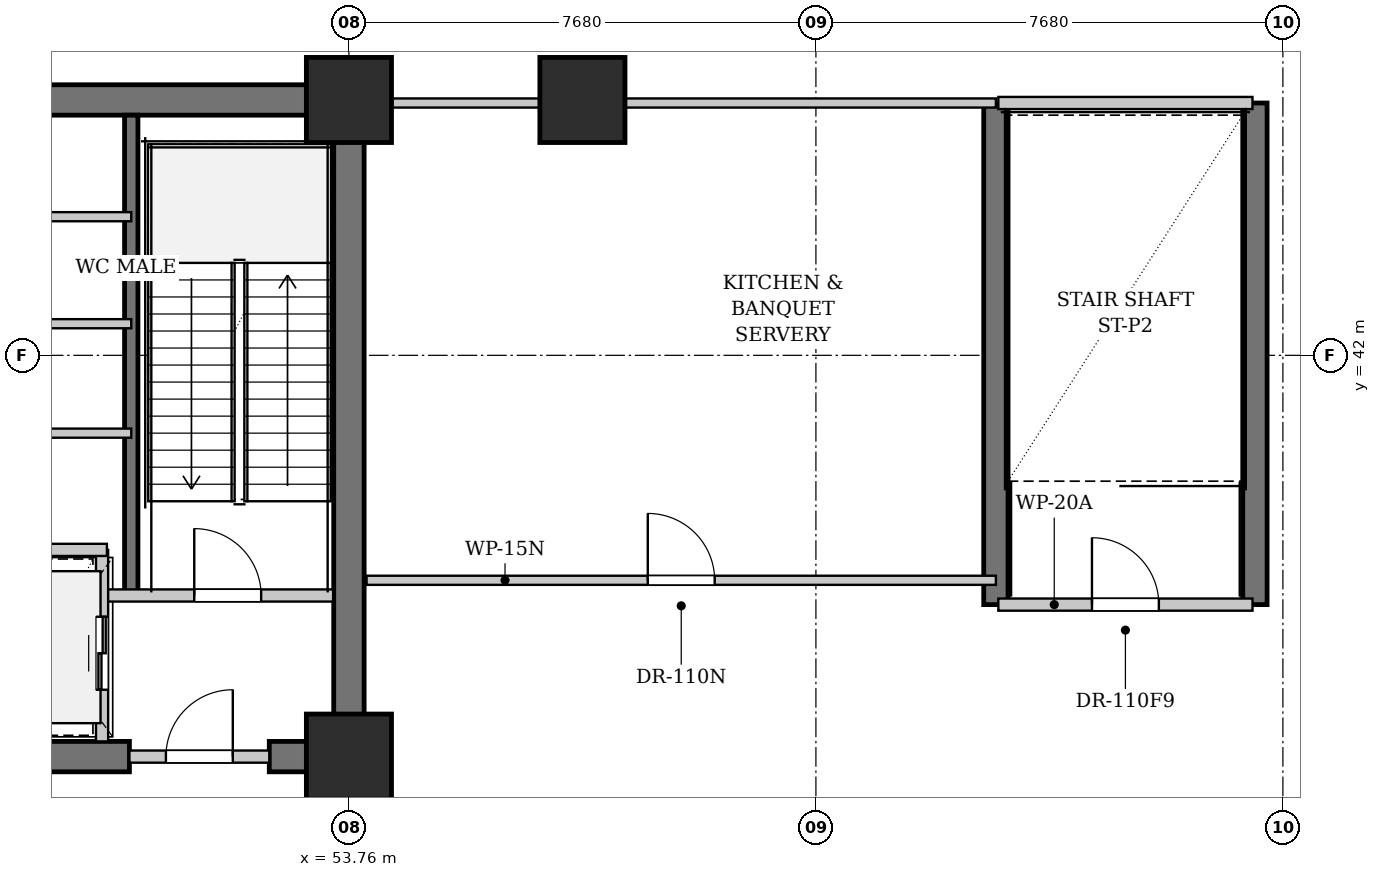
"""IFC4 building model, lengths in metres.
Left out: names, types, materials, properties, quantities, classifications, styles, units other than length and angle.
Written with IfcOpenShell. Run it as: python <this file> out.ifc"""

import sys

from ifc_helpers import new_model, si_unit, direction, frame, frame_2d, origin, origin_2d, place, context, subcontext, project, spatial, rectangle, extrude, element, fill, save


model = new_model("IFC4")
c1 = context("Model", 3, precision=1e-05, world=origin(), true_north=direction((0.0, 1.0)))
c2 = subcontext(c1, "Body", "Model", "MODEL_VIEW")
j1 = project(units=[si_unit("LENGTHUNIT", "METRE"), si_unit("PLANEANGLEUNIT", "RADIAN")], contexts=[c1])
p1 = place(None, origin())
s1 = spatial("IfcSite", under=j1, at=p1, CompositionType="ELEMENT")
p2 = place(p1, origin())
s2 = spatial("IfcBuilding", under=s1, at=p2, CompositionType="ELEMENT")
p3 = place(p2, frame((0.0, 0.0, 25.2)))
s3 = spatial("IfcBuildingStorey", under=s2, at=p3, CompositionType="ELEMENT", Elevation=25.2)
p4 = place(p3, frame((22.79, 46.2, 0.0), z_axis=(0.0, 0.0, 1.0), x_axis=(1.0, 0.0, 0.0)))
e1 = element("IfcWall", 1, at=p4, inside=s3, PredefinedType="SHEAR", context=c2, shape_type="SweptSolid", body=[
    extrude(rectangle(XDim=31.22, YDim=0.5, at=frame_2d((15.61, 0.0))), origin(), (0.0, 0.0, 1.0), 4.78),
])
p5 = place(p3, frame((42.1, 35.4, 0.0), z_axis=(0.0, 0.0, 1.0), x_axis=(1.0, 0.0, 0.0)))
e2 = element("IfcWall", 2, at=p5, inside=s3, PredefinedType="SHEAR", context=c2, shape_type="SweptSolid", body=[
    extrude(rectangle(XDim=8.05, YDim=0.5, at=frame_2d((4.025, 0.0))), origin(), (0.0, 0.0, 1.0), 4.78),
])
p6 = place(p5, frame((4.85, 0.0, 0.0)))
e3 = element("IfcOpeningElement", 3, at=p6, cuts=e2, PredefinedType="OPENING", context=c2, shape_type="SweptSolid", body=[
    extrude(rectangle(XDim=0.9, YDim=2.15, at=frame_2d((0.45, 1.075))), frame((0.0, 0.26, 0.0), z_axis=(0.0, -1.0, 0.0), x_axis=(1.0, 0.0, 0.0)), (0.0, 0.0, 1.0), 0.52),
])
p7 = place(p3, frame((52.45, 35.4, 0.0), z_axis=(0.0, 0.0, 1.0), x_axis=(1.0, 0.0, 0.0)))
e4 = element("IfcWall", 4, at=p7, inside=s3, PredefinedType="SHEAR", context=c2, shape_type="SweptSolid", body=[
    extrude(rectangle(XDim=1.56, YDim=0.5, at=frame_2d((0.78, 0.0))), origin(), (0.0, 0.0, 1.0), 4.78),
])
p8 = place(p3, frame((53.76, 35.65, 0.0), z_axis=(0.0, 0.0, 1.0), x_axis=(0.0, 1.0, 0.0)))
e5 = element("IfcWall", 5, at=p8, inside=s3, PredefinedType="SHEAR", context=c2, shape_type="SweptSolid", body=[
    extrude(rectangle(XDim=10.3, YDim=0.5, at=frame_2d((5.15, 0.0))), origin(), (0.0, 0.0, 1.0), 4.78),
])
p9 = place(p3, frame((50.18, 38.05, 0.0), z_axis=(0.0, 0.0, 1.0), x_axis=(0.0, 1.0, 0.0)))
e6 = element("IfcWall", 6, at=p9, inside=s3, PredefinedType="SHEAR", context=c2, shape_type="SweptSolid", body=[
    extrude(rectangle(XDim=7.9, YDim=0.22, at=frame_2d((3.95, 0.0))), origin(), (0.0, 0.0, 1.0), 4.78),
])
for number, where, z_axis, x_axis in (
    (7, (64.4, 37.9, 0.0), (0.0, 0.0, 1.0), (0.0, 1.0, 0.0)),
    (8, (68.66, 37.9, 0.0), (0.0, 0.0, 1.0), (0.0, 1.0, 0.0)),
):
    element("IfcWall", number, at=place(p3, frame(where, z_axis=z_axis, x_axis=x_axis)), inside=s3, PredefinedType="SHEAR", context=c2, shape_type="SweptSolid", body=[
        extrude(rectangle(XDim=8.25, YDim=0.4, at=frame_2d((4.125, 0.0))), origin(), (0.0, 0.0, 1.0), 4.78),
    ])
for number, where, z_axis, x_axis in (
    (9, (53.76, 35.4, 0.0), (0.0, 0.0, 1.0), (1.0, 0.0, 0.0)),
    (10, (53.76, 46.2, 0.0), (0.0, 0.0, 1.0), (1.0, 0.0, 0.0)),
    (11, (57.6, 46.2, 0.0), (0.0, 0.0, 1.0), (1.0, 0.0, 0.0)),
):
    element("IfcColumn", number, at=place(p3, frame(where, z_axis=z_axis, x_axis=x_axis)), inside=s3, PredefinedType="COLUMN", context=c2, shape_type="SweptSolid", body=[
        extrude(rectangle(XDim=1.4, YDim=1.4, at=origin_2d()), origin(), (0.0, 0.0, 1.0), 5.2),
    ])
p10 = place(p3, frame((49.78, 38.05, 0.0), z_axis=(0.0, 0.0, 1.0), x_axis=(1.0, 0.0, 0.0)))
e12 = element("IfcWall", 12, at=p10, inside=s3, PredefinedType="PARTITIONING", context=c2, shape_type="SweptSolid", body=[
    extrude(rectangle(XDim=3.72, YDim=0.2, at=frame_2d((1.86, 0.0))), origin(), (0.0, 0.0, 1.0), 4.78),
])
p11 = place(p10, frame((1.436, 0.0, 0.0)))
e13 = element("IfcOpeningElement", 13, at=p11, cuts=e12, PredefinedType="OPENING", context=c2, shape_type="SweptSolid", body=[
    extrude(rectangle(XDim=1.1, YDim=2.15, at=frame_2d((0.55, 1.075))), frame((0.0, 0.11, 0.0), z_axis=(0.0, -1.0, 0.0), x_axis=(1.0, 0.0, 0.0)), (0.0, 0.0, 1.0), 0.22),
])
p12 = place(p3, frame((50.15, 35.4, 0.0), z_axis=(0.0, 0.0, 1.0), x_axis=(1.0, 0.0, 0.0)))
e14 = element("IfcWall", 14, at=p12, inside=s3, PredefinedType="PARTITIONING", context=c2, shape_type="SweptSolid", body=[
    extrude(rectangle(XDim=2.3, YDim=0.2, at=frame_2d((1.15, 0.0))), origin(), (0.0, 0.0, 1.0), 3.767),
])
p13 = place(p12, frame((0.6, 0.0, 0.0)))
e15 = element("IfcOpeningElement", 15, at=p13, cuts=e14, PredefinedType="OPENING", context=c2, shape_type="SweptSolid", body=[
    extrude(rectangle(XDim=1.1, YDim=2.15, at=frame_2d((0.55, 1.075))), frame((0.0, 0.11, 0.0), z_axis=(0.0, -1.0, 0.0), x_axis=(1.0, 0.0, 0.0)), (0.0, 0.0, 1.0), 0.22),
])
p14 = place(p3, frame((49.7, 35.65, 0.0), z_axis=(0.0, 0.0, 1.0), x_axis=(0.0, 1.0, 0.0)))
e16 = element("IfcWall", 16, at=p14, inside=s3, PredefinedType="PARTITIONING", context=c2, shape_type="SweptSolid", body=[
    extrude(rectangle(XDim=3.15, YDim=0.2, at=frame_2d((1.575, 0.0))), origin(), (0.0, 0.0, 1.0), 4.78),
])
p15 = place(p14, frame((0.85, 0.0, 0.0)))
e17 = element("IfcOpeningElement", 17, at=p15, cuts=e16, PredefinedType="OPENING", context=c2, shape_type="SweptSolid", body=[
    extrude(rectangle(XDim=1.2, YDim=2.2, at=frame_2d((0.6, 1.1))), frame((0.0, 0.11, 0.0), z_axis=(0.0, -1.0, 0.0), x_axis=(1.0, 0.0, 0.0)), (0.0, 0.0, 1.0), 0.22),
])
p16 = place(p3, frame((47.92, 38.8, 0.0), z_axis=(0.0, 0.0, 1.0), x_axis=(1.0, 0.0, 0.0)))
e18 = element("IfcWall", 18, at=p16, inside=s3, PredefinedType="PARTITIONING", context=c2, shape_type="SweptSolid", body=[
    extrude(rectangle(XDim=1.86, YDim=0.2, at=frame_2d((0.93, 0.0))), origin(), (0.0, 0.0, 1.0), 4.78),
])
for number, where, z_axis, x_axis in (
    (19, (47.88, 40.72, 0.0), (0.0, 0.0, 1.0), (1.0, 0.0, 0.0)),
    (20, (47.88, 42.52, 0.0), (0.0, 0.0, 1.0), (1.0, 0.0, 0.0)),
    (21, (47.88, 44.28, 0.0), (0.0, 0.0, 1.0), (1.0, 0.0, 0.0)),
):
    element("IfcWall", number, at=place(p3, frame(where, z_axis=z_axis, x_axis=x_axis)), inside=s3, PredefinedType="PARTITIONING", context=c2, shape_type="SweptSolid", body=[
        extrude(rectangle(XDim=2.3, YDim=0.15, at=frame_2d((1.15, 0.0))), origin(), (0.0, 0.0, 1.0), 4.78),
    ])
p17 = place(p3, frame((64.44, 37.9, 0.0), z_axis=(0.0, 0.0, 1.0), x_axis=(1.0, 0.0, 0.0)))
e22 = element("IfcWall", 22, at=p17, inside=s3, PredefinedType="PARTITIONING", context=c2, shape_type="SweptSolid", body=[
    extrude(rectangle(XDim=4.18, YDim=0.2, at=frame_2d((2.09, 0.0))), origin(), (0.0, 0.0, 1.0), 4.78),
])
p18 = place(p17, frame((1.54, 0.0, 0.0)))
e23 = element("IfcOpeningElement", 23, at=p18, cuts=e22, PredefinedType="OPENING", context=c2, shape_type="SweptSolid", body=[
    extrude(rectangle(XDim=1.1, YDim=2.15, at=frame_2d((0.55, 1.075))), frame((0.0, 0.11, 0.0), z_axis=(0.0, -1.0, 0.0), x_axis=(1.0, 0.0, 0.0)), (0.0, 0.0, 1.0), 0.22),
])
p19 = place(p3, frame((64.44, 46.15, 0.0), z_axis=(0.0, 0.0, 1.0), x_axis=(1.0, 0.0, 0.0)))
e24 = element("IfcWall", 24, at=p19, inside=s3, PredefinedType="PARTITIONING", context=c2, shape_type="SweptSolid", body=[
    extrude(rectangle(XDim=4.18, YDim=0.2, at=frame_2d((2.09, 0.0))), origin(), (0.0, 0.0, 1.0), 4.78),
])
p20 = place(p3, frame((54.05, 38.3, 0.0), z_axis=(0.0, 0.0, 1.0), x_axis=(1.0, 0.0, 0.0)))
e25 = element("IfcWall", 25, at=p20, inside=s3, PredefinedType="PARTITIONING", context=c2, shape_type="SweptSolid", body=[
    extrude(rectangle(XDim=10.35, YDim=0.15, at=frame_2d((5.175, 0.0))), origin(), (0.0, 0.0, 1.0), 4.78),
])
p21 = place(p20, frame((4.625, 0.0, 0.0)))
e26 = element("IfcOpeningElement", 26, at=p21, cuts=e25, PredefinedType="OPENING", context=c2, shape_type="SweptSolid", body=[
    extrude(rectangle(XDim=1.1, YDim=2.15, at=frame_2d((0.55, 1.075))), frame((0.0, 0.085, 0.0), z_axis=(0.0, -1.0, 0.0), x_axis=(1.0, 0.0, 0.0)), (0.0, 0.0, 1.0), 0.17),
])
p22 = place(p3, frame((54.05, 46.15, 0.0), z_axis=(0.0, 0.0, 1.0), x_axis=(1.0, 0.0, 0.0)))
e27 = element("IfcWall", 27, at=p22, inside=s3, PredefinedType="PARTITIONING", context=c2, shape_type="SweptSolid", body=[
    extrude(rectangle(XDim=10.35, YDim=0.15, at=frame_2d((5.175, 0.0))), origin(), (0.0, 0.0, 1.0), 4.78),
])
p23 = place(p11, origin())
e28 = element("IfcDoor", 28, at=p23, inside=s3, OperationType="SINGLE_SWING_LEFT", PredefinedType="DOOR", context=c2, shape_type="SweptSolid", body=[
    extrude(rectangle(XDim=1.1, YDim=2.15, at=frame_2d((0.55, 1.075))), frame((0.0, 0.025, 0.0), z_axis=(0.0, -1.0, 0.0), x_axis=(1.0, 0.0, 0.0)), (0.0, 0.0, 1.0), 0.05),
])
fill(e13, e28)
p24 = place(p13, origin())
e29 = element("IfcDoor", 29, at=p24, inside=s3, OperationType="SINGLE_SWING_RIGHT", PredefinedType="DOOR", context=c2, shape_type="SweptSolid", body=[
    extrude(rectangle(XDim=1.1, YDim=2.15, at=frame_2d((0.55, 1.075))), frame((0.0, 0.025, 0.0), z_axis=(0.0, -1.0, 0.0), x_axis=(1.0, 0.0, 0.0)), (0.0, 0.0, 1.0), 0.05),
])
fill(e15, e29)
p25 = place(p15, origin())
e30 = element("IfcDoor", 30, at=p25, inside=s3, OperationType="DOUBLE_DOOR_SLIDING", PredefinedType="DOOR", context=c2, shape_type="SweptSolid", body=[
    extrude(rectangle(XDim=1.2, YDim=2.2, at=frame_2d((0.6, 1.1))), frame((0.0, 0.025, 0.0), z_axis=(0.0, -1.0, 0.0), x_axis=(1.0, 0.0, 0.0)), (0.0, 0.0, 1.0), 0.05),
])
fill(e17, e30)
p26 = place(p18, origin())
e31 = element("IfcDoor", 31, at=p26, inside=s3, OperationType="SINGLE_SWING_LEFT", PredefinedType="DOOR", context=c2, shape_type="SweptSolid", body=[
    extrude(rectangle(XDim=1.1, YDim=2.15, at=frame_2d((0.55, 1.075))), frame((0.0, 0.025, 0.0), z_axis=(0.0, -1.0, 0.0), x_axis=(1.0, 0.0, 0.0)), (0.0, 0.0, 1.0), 0.05),
])
fill(e23, e31)
p27 = place(p21, origin())
e32 = element("IfcDoor", 32, at=p27, inside=s3, OperationType="SINGLE_SWING_LEFT", PredefinedType="DOOR", context=c2, shape_type="SweptSolid", body=[
    extrude(rectangle(XDim=1.1, YDim=2.15, at=frame_2d((0.55, 1.075))), frame((0.0, 0.025, 0.0), z_axis=(0.0, -1.0, 0.0), x_axis=(1.0, 0.0, 0.0)), (0.0, 0.0, 1.0), 0.05),
])
fill(e26, e32)
save(model, sys.argv[1])
